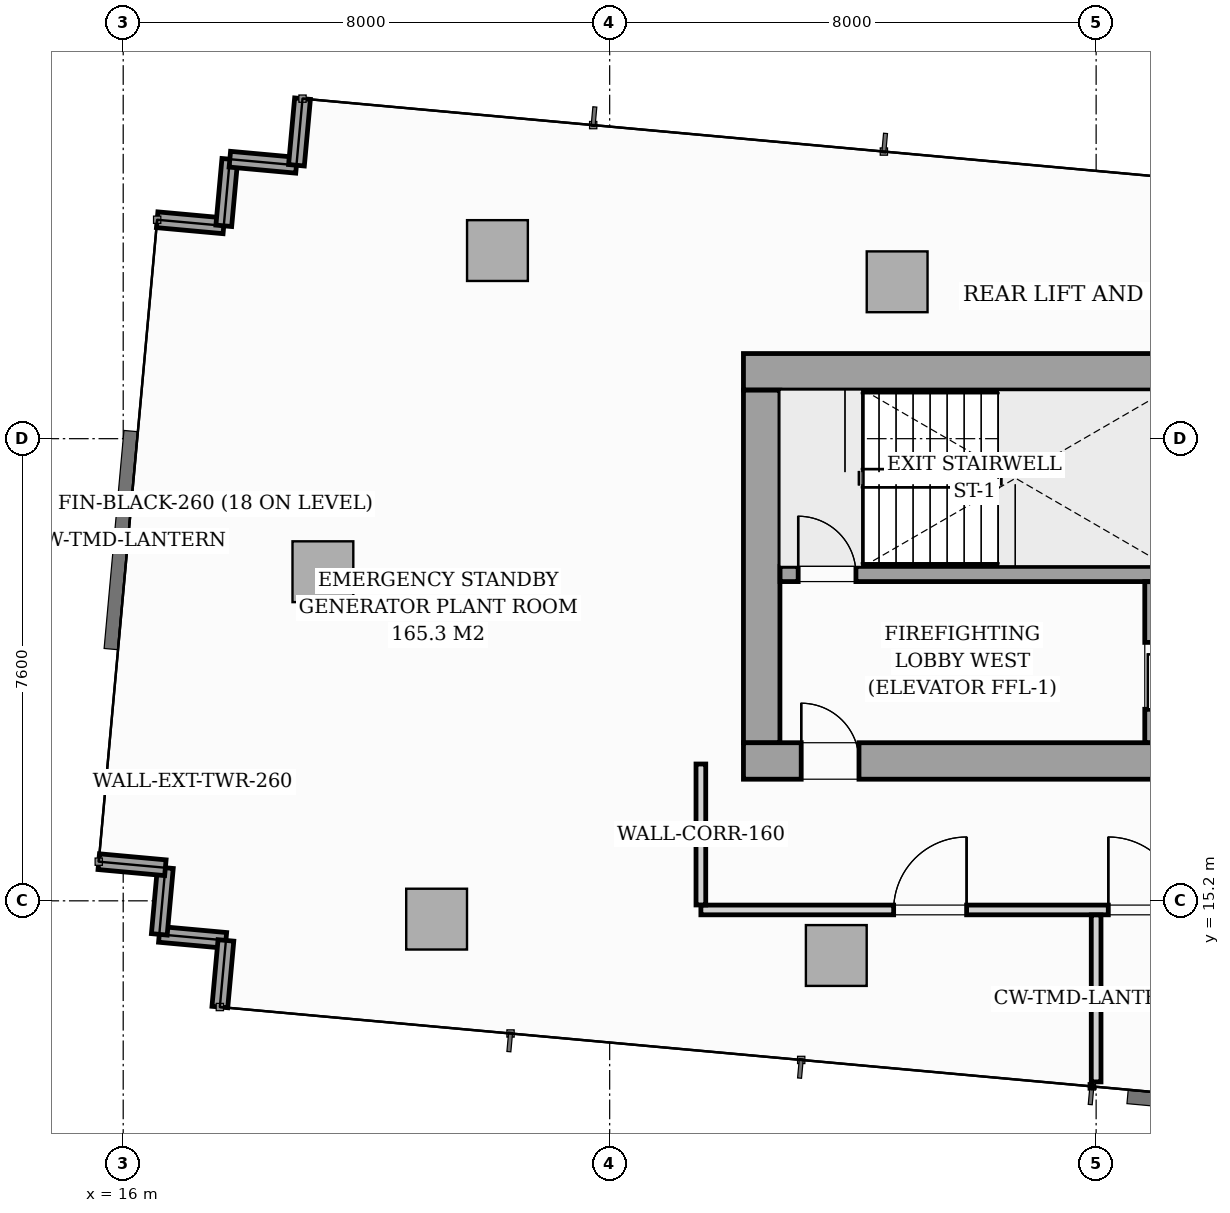
"""IFC4 building model, lengths in metres.
Left out: names, types, materials, properties, quantities, classifications, styles, units other than length and angle.
Written with IfcOpenShell. Run it as: python <this file> out.ifc"""

import sys

from ifc_helpers import new_model, si_unit, direction, frame, frame_2d, origin, origin_2d, place, context, subcontext, project, spatial, rectangle, i_section, extrude, source, transform, mapped, element, fill, save


model = new_model("IFC4")
c1 = context("Model", 3, precision=1e-05, world=origin(), true_north=direction((0.0, 1.0)))
c2 = subcontext(c1, "Body", "Model", "MODEL_VIEW")
j1 = project(units=[si_unit("LENGTHUNIT", "METRE"), si_unit("PLANEANGLEUNIT", "RADIAN")], contexts=[c1])
p1 = place(None, origin())
s1 = spatial("IfcSite", under=j1, at=p1, CompositionType="ELEMENT")
p2 = place(p1, origin())
s2 = spatial("IfcBuilding", under=s1, at=p2, CompositionType="ELEMENT")
p3 = place(p2, frame((0.0, 0.0, 277.3)))
s3 = spatial("IfcBuildingStorey", under=s2, at=p3, CompositionType="ELEMENT", Elevation=277.3)
m1 = source(origin(), c2, "Body", "SweptSolid", [
    extrude(i_section(OverallWidth=0.404, OverallDepth=0.407, WebThickness=0.027, FlangeThickness=0.044, FilletRadius=0.018, at=origin_2d()), origin(), (0.0, 0.0, 1.0), 6.496),
])
for number, where, z_axis, x_axis in (
    (1, (26.4, 17.4, 0.002), (0.0, 0.0, 1.0), (1.0, 0.0, 0.0)),
    (2, (26.4, 24.0, 0.002), (0.0, 0.0, 1.0), (1.0, 0.0, 0.0)),
):
    element("IfcColumn", number, at=place(p3, frame(where, z_axis=z_axis, x_axis=x_axis)), inside=s3, PredefinedType="PILASTER", context=c2, shape_type="MappedRepresentation", body=[
        mapped(m1, transform((0.0, 0.0, 0.0), scale=1.0)),
    ])
m2 = source(origin(), c2, "Body", "SweptSolid", [
    extrude(rectangle(XDim=1.0, YDim=1.0, at=origin_2d()), origin(), (0.0, 0.0, 1.0), 6.496),
])
for number, where, z_axis, x_axis in (
    (3, (21.154, 14.899, 0.002), (0.0, 0.0, 1.0), (0.996, -0.091, 0.0)),
    (4, (27.727, 14.301, 0.002), (0.0, 0.0, 1.0), (0.996, -0.091, 0.0)),
    (5, (22.155, 25.894, 0.002), (0.0, 0.0, 1.0), (0.996, -0.091, 0.0)),
    (6, (28.728, 25.38, 0.002), (0.0, 0.0, 1.0), (0.996, -0.091, 0.0)),
    (7, (19.284, 20.612, 0.002), (0.0, 0.0, 1.0), (0.996, -0.091, 0.0)),
):
    element("IfcColumn", number, at=place(p3, frame(where, z_axis=z_axis, x_axis=x_axis)), inside=s3, PredefinedType="COLUMN", context=c2, shape_type="MappedRepresentation", body=[
        mapped(m2, transform((0.0, 0.0, 0.0), scale=1.0)),
    ])
p4 = place(p3, frame((17.689, 14.549, 0.0), z_axis=(0.0, 0.0, 1.0), x_axis=(-0.995893206468, 0.090535746043, 0.0)))
e8 = element("IfcWall", 8, at=p4, inside=s3, PredefinedType="STANDARD", context=c2, shape_type="SweptSolid", body=[
    extrude(rectangle(XDim=1.1, YDim=0.26, at=frame_2d((0.55, 0.0))), origin(), (0.0, 0.0, 1.0), 6.22),
])
for number, where, z_axis, x_axis in (
    (9, (16.594, 14.649, 0.0), (0.0, 0.0, 1.0), (0.091, 0.996, 0.0)),
    (10, (16.693, 15.744, 0.0), (0.0, 0.0, 1.0), (-0.996, 0.091, 0.0)),
    (11, (16.559, 26.4, 0.0), (0.0, 0.0, 1.0), (0.996, -0.091, 0.0)),
    (12, (17.654, 26.301, 0.0), (0.0, 0.0, 1.0), (0.091, 0.996, 0.0)),
    (13, (17.754, 27.396, 0.0), (0.0, 0.0, 1.0), (0.996, -0.091, 0.0)),
    (14, (18.849, 27.296, 0.0), (0.0, 0.0, 1.0), (0.091, 0.996, 0.0)),
    (15, (17.589, 13.454, 0.0), (0.0, 0.0, 1.0), (0.091, 0.996, 0.0)),
):
    element("IfcWall", number, at=place(p3, frame(where, z_axis=z_axis, x_axis=x_axis)), inside=s3, PredefinedType="STANDARD", context=c2, shape_type="SweptSolid", body=[
        extrude(rectangle(XDim=1.1, YDim=0.26, at=frame_2d((0.55, 0.0))), origin(), (0.0, 0.0, 1.0), 6.22),
    ])
p5 = place(p3, frame((26.2, 17.5, 0.0), z_axis=(0.0, 0.0, 1.0), x_axis=(1.0, 0.0, 0.0)))
e16 = element("IfcWall", 16, at=p5, inside=s3, PredefinedType="SHEAR", context=c2, shape_type="SweptSolid", body=[
    extrude(rectangle(XDim=19.6, YDim=0.6, at=frame_2d((9.8, 0.0))), origin(), (0.0, 0.0, 1.0), 6.5),
])
p6 = place(p5, frame((0.95, 0.0, 0.0)))
e17 = element("IfcOpeningElement", 17, at=p6, cuts=e16, PredefinedType="OPENING", context=c2, shape_type="SweptSolid", body=[
    extrude(rectangle(XDim=0.95, YDim=2.06, at=frame_2d((0.475, 1.03))), frame((0.0, 0.31, 0.0), z_axis=(0.0, -1.0, 0.0), x_axis=(1.0, 0.0, 0.0)), (0.0, 0.0, 1.0), 0.62),
])
p7 = place(p5, frame((9.38, 0.0, 0.0)))
e18 = element("IfcOpeningElement", 18, at=p7, cuts=e16, PredefinedType="OPENING", context=c2, shape_type="SweptSolid", body=[
    extrude(rectangle(XDim=0.9, YDim=2.06, at=frame_2d((0.45, 1.03))), frame((0.0, 0.31, 0.0), z_axis=(0.0, -1.0, 0.0), x_axis=(1.0, 0.0, 0.0)), (0.0, 0.0, 1.0), 0.62),
])
p8 = place(p5, frame((17.55, 0.0, 0.0)))
e19 = element("IfcOpeningElement", 19, at=p8, cuts=e16, PredefinedType="OPENING", context=c2, shape_type="SweptSolid", body=[
    extrude(rectangle(XDim=0.95, YDim=2.06, at=frame_2d((0.475, 1.03))), frame((0.0, 0.31, 0.0), z_axis=(0.0, -1.0, 0.0), x_axis=(1.0, 0.0, 0.0)), (0.0, 0.0, 1.0), 0.62),
])
p9 = place(p3, frame((26.2, 23.9, 0.0), z_axis=(0.0, 0.0, 1.0), x_axis=(1.0, 0.0, 0.0)))
e20 = element("IfcWall", 20, at=p9, inside=s3, PredefinedType="SHEAR", context=c2, shape_type="SweptSolid", body=[
    extrude(rectangle(XDim=19.6, YDim=0.6, at=frame_2d((9.8, 0.0))), origin(), (0.0, 0.0, 1.0), 6.5),
])
p10 = place(p3, frame((26.5, 17.802, 0.0), z_axis=(0.0, 0.0, 1.0), x_axis=(0.0, 1.0, 0.0)))
e21 = element("IfcWall", 21, at=p10, inside=s3, PredefinedType="SHEAR", context=c2, shape_type="SweptSolid", body=[
    extrude(rectangle(XDim=5.796, YDim=0.6, at=frame_2d((2.898, 0.0))), origin(), (0.0, 0.0, 1.0), 6.5),
])
p11 = place(p3, frame((26.802, 20.575, 0.0), z_axis=(0.0, 0.0, 1.0), x_axis=(1.0, 0.0, 0.0)))
e22 = element("IfcWall", 22, at=p11, inside=s3, PredefinedType="SOLIDWALL", context=c2, shape_type="SweptSolid", body=[
    extrude(rectangle(XDim=8.148, YDim=0.25, at=frame_2d((4.074, 0.0))), origin(), (0.0, 0.0, 1.0), 6.5),
])
p12 = place(p11, frame((0.298, 0.0, 0.0)))
e23 = element("IfcOpeningElement", 23, at=p12, cuts=e22, PredefinedType="OPENING", context=c2, shape_type="SweptSolid", body=[
    extrude(rectangle(XDim=0.95, YDim=2.06, at=frame_2d((0.475, 1.03))), frame((0.0, 0.135, 0.0), z_axis=(0.0, -1.0, 0.0), x_axis=(1.0, 0.0, 0.0)), (0.0, 0.0, 1.0), 0.27),
])
p13 = place(p3, frame((32.925, 17.802, 0.0), z_axis=(0.0, 0.0, 1.0), x_axis=(0.0, 1.0, 0.0)))
e24 = element("IfcWall", 24, at=p13, inside=s3, PredefinedType="SOLIDWALL", context=c2, shape_type="SweptSolid", body=[
    extrude(rectangle(XDim=2.646, YDim=0.25, at=frame_2d((1.323, 0.0))), origin(), (0.0, 0.0, 1.0), 6.5),
])
p14 = place(p13, frame((0.548, 0.0, 0.0)))
e25 = element("IfcOpeningElement", 25, at=p14, cuts=e24, PredefinedType="OPENING", context=c2, shape_type="SweptSolid", body=[
    extrude(rectangle(XDim=1.1, YDim=2.08, at=frame_2d((0.55, 1.04))), frame((0.0, 0.135, 0.0), z_axis=(0.0, -1.0, 0.0), x_axis=(1.0, 0.0, 0.0)), (0.0, 0.0, 1.0), 0.27),
])
p15 = place(p3, frame((25.5, 15.05, 0.0), z_axis=(0.0, 0.0, 1.0), x_axis=(1.0, 0.0, 0.0)))
e26 = element("IfcWall", 26, at=p15, inside=s3, PredefinedType="PARTITIONING", context=c2, shape_type="SweptSolid", body=[
    extrude(rectangle(XDim=21.0, YDim=0.16, at=frame_2d((10.5, 0.0))), origin(), (0.0, 0.0, 1.0), 5.948),
])
p16 = place(p15, frame((3.17, 0.0, 0.0)))
e27 = element("IfcOpeningElement", 27, at=p16, cuts=e26, PredefinedType="OPENING", context=c2, shape_type="SweptSolid", body=[
    extrude(rectangle(XDim=1.2, YDim=2.08, at=frame_2d((0.6, 1.04))), frame((0.0, 0.09, 0.0), z_axis=(0.0, -1.0, 0.0), x_axis=(1.0, 0.0, 0.0)), (0.0, 0.0, 1.0), 0.18),
])
p17 = place(p15, frame((6.7, 0.0, 0.0)))
e28 = element("IfcOpeningElement", 28, at=p17, cuts=e26, PredefinedType="OPENING", context=c2, shape_type="SweptSolid", body=[
    extrude(rectangle(XDim=1.2, YDim=2.08, at=frame_2d((0.6, 1.04))), frame((0.0, 0.09, 0.0), z_axis=(0.0, -1.0, 0.0), x_axis=(1.0, 0.0, 0.0)), (0.0, 0.0, 1.0), 0.18),
])
p18 = place(p15, frame((17.1, 0.0, 0.0)))
e29 = element("IfcOpeningElement", 29, at=p18, cuts=e26, PredefinedType="OPENING", context=c2, shape_type="SweptSolid", body=[
    extrude(rectangle(XDim=1.2, YDim=2.08, at=frame_2d((0.6, 1.04))), frame((0.0, 0.09, 0.0), z_axis=(0.0, -1.0, 0.0), x_axis=(1.0, 0.0, 0.0)), (0.0, 0.0, 1.0), 0.18),
])
p19 = place(p3, frame((25.5, 15.132, 0.0), z_axis=(0.0, 0.0, 1.0), x_axis=(0.0, 1.0, 0.0)))
e30 = element("IfcWall", 30, at=p19, inside=s3, PredefinedType="PARTITIONING", context=c2, shape_type="SweptSolid", body=[
    extrude(rectangle(XDim=2.318, YDim=0.16, at=frame_2d((1.159, 0.0))), origin(), (0.0, 0.0, 1.0), 6.22),
])
p20 = place(p3, frame((32.0, 12.222, 0.0), z_axis=(0.0, 0.0, 1.0), x_axis=(0.0, 1.0, 0.0)))
e31 = element("IfcWall", 31, at=p20, inside=s3, PredefinedType="PARTITIONING", context=c2, shape_type="SweptSolid", body=[
    extrude(rectangle(XDim=2.746, YDim=0.16, at=frame_2d((1.373, 0.0))), origin(), (0.0, 0.0, 1.0), 6.22),
])
m3 = source(origin(), c2, "Body", "SweptSolid", [
    extrude(rectangle(XDim=0.95, YDim=2.06, at=frame_2d((0.475, 1.03))), frame((0.0, 0.025, 0.0), z_axis=(0.0, -1.0, 0.0), x_axis=(1.0, 0.0, 0.0)), (0.0, 0.0, 1.0), 0.05),
])
p21 = place(p6, origin())
e32 = element("IfcDoor", 32, at=p21, inside=s3, OperationType="SINGLE_SWING_LEFT", PredefinedType="DOOR", context=c2, shape_type="MappedRepresentation", body=[
    mapped(m3, transform((0.0, 0.0, 0.0), scale=1.0)),
])
fill(e17, e32)
p22 = place(p12, origin())
e33 = element("IfcDoor", 33, at=p22, inside=s3, OperationType="SINGLE_SWING_LEFT", PredefinedType="DOOR", context=c2, shape_type="MappedRepresentation", body=[
    mapped(m3, transform((0.0, 0.0, 0.0), scale=1.0)),
])
fill(e23, e33)
m4 = source(origin(), c2, "Body", "SweptSolid", [
    extrude(rectangle(XDim=1.2, YDim=2.08, at=frame_2d((0.6, 1.04))), frame((0.0, 0.025, 0.0), z_axis=(0.0, -1.0, 0.0), x_axis=(1.0, 0.0, 0.0)), (0.0, 0.0, 1.0), 0.05),
])
p23 = place(p16, origin())
e34 = element("IfcDoor", 34, at=p23, inside=s3, OperationType="SINGLE_SWING_RIGHT", PredefinedType="DOOR", context=c2, shape_type="MappedRepresentation", body=[
    mapped(m4, transform((0.0, 0.0, 0.0), scale=1.0)),
])
fill(e27, e34)
p24 = place(p17, origin())
e35 = element("IfcDoor", 35, at=p24, inside=s3, OperationType="SINGLE_SWING_LEFT", PredefinedType="DOOR", context=c2, shape_type="MappedRepresentation", body=[
    mapped(m4, transform((0.0, 0.0, 0.0), scale=1.0)),
])
fill(e28, e35)
save(model, sys.argv[1])
